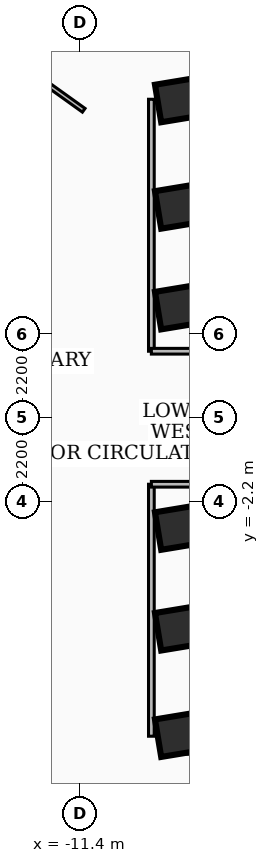
"""IFC4 building model, lengths in metres.
Left out: names, types, materials, properties, quantities, classifications, styles, units other than length and angle.
Written with IfcOpenShell. Run it as: python <this file> out.ifc"""

import sys

from ifc_helpers import new_model, si_unit, direction, frame, frame_2d, origin, origin_2d, place, context, subcontext, project, spatial, rectangle, extrude, element, save


model = new_model("IFC4")
c1 = context("Model", 3, precision=1e-05, world=origin(), true_north=direction((0.0, 1.0)))
c2 = subcontext(c1, "Body", "Model", "MODEL_VIEW")
j1 = project(units=[si_unit("LENGTHUNIT", "METRE"), si_unit("PLANEANGLEUNIT", "RADIAN")], contexts=[c1])
p1 = place(None, origin())
s1 = spatial("IfcSite", under=j1, at=p1, CompositionType="ELEMENT")
p2 = place(p1, origin())
s2 = spatial("IfcBuilding", under=s1, at=p2, CompositionType="ELEMENT")
p3 = place(p2, frame((0.0, 0.0, 92.88)))
s3 = spatial("IfcBuildingStorey", under=s2, at=p3, CompositionType="ELEMENT", Elevation=92.88)
for number, where, z_axis, x_axis in (
    (1, (-8.78, 8.56, 0.0), (0.0, 0.0, 1.0), (1.0, 0.0, 0.0)),
    (2, (8.78, -8.56, 0.0), (0.0, 0.0, 1.0), (-1.0, 0.0, 0.0)),
):
    element("IfcWall", number, at=place(p3, frame(where, z_axis=z_axis, x_axis=x_axis)), inside=s3, PredefinedType="SHEAR", context=c2, shape_type="SweptSolid", body=[
        extrude(rectangle(XDim=17.56, YDim=0.5, at=frame_2d((8.78, 0.0))), origin(), (0.0, 0.0, 1.0), 3.34),
    ])
for number, where, z_axis, x_axis in (
    (3, (-8.85, -5.55, 0.0), (0.0, 0.0, 1.0), (0.987, 0.163, 0.0)),
    (4, (-8.85, -2.9, 0.0), (0.0, 0.0, 1.0), (0.987, 0.163, 0.0)),
    (5, (-8.85, 2.9, 0.0), (0.0, 0.0, 1.0), (0.987, 0.163, 0.0)),
    (6, (-8.85, 5.55, 0.0), (0.0, 0.0, 1.0), (0.987, 0.163, 0.0)),
    (7, (-8.85, 8.35, 0.0), (0.0, 0.0, 1.0), (0.987, 0.163, 0.0)),
    (8, (-8.85, -8.35, 0.0), (0.0, 0.0, 1.0), (0.987, 0.163, 0.0)),
):
    element("IfcColumn", number, at=place(p3, frame(where, z_axis=z_axis, x_axis=x_axis)), inside=s3, PredefinedType="COLUMN", context=c2, shape_type="SweptSolid", body=[
        extrude(rectangle(XDim=1.0, YDim=1.0, at=origin_2d()), origin(), (0.0, 0.0, 1.0), 3.6),
    ])
p4 = place(p3, frame((-12.12, -15.142, 0.0), z_axis=(0.0, 0.0, 1.0), x_axis=(-0.163241835244, 0.986586085056, 0.0)))
e9 = element("IfcWall", 9, at=p4, inside=s3, PredefinedType="SOLIDWALL", context=c2, shape_type="SweptSolid", body=[
    extrude(rectangle(XDim=6.775, YDim=0.24, at=frame_2d((3.387, 0.0))), origin(), (0.0, 0.0, 1.0), 2.644),
])
p5 = place(p3, frame((-9.52, 1.75, 0.0), z_axis=(0.0, 0.0, 1.0), x_axis=(0.0, 1.0, 0.0)))
e10 = element("IfcWall", 10, at=p5, inside=s3, PredefinedType="PARTITIONING", context=c2, shape_type="SweptSolid", body=[
    extrude(rectangle(XDim=6.63, YDim=0.15, at=frame_2d((3.315, 0.0))), origin(), (0.0, 0.0, 1.0), 2.486),
])
p6 = place(p3, frame((-7.85, 1.75, 0.0), z_axis=(0.0, 0.0, 1.0), x_axis=(-1.0, 0.0, 0.0)))
e11 = element("IfcWall", 11, at=p6, inside=s3, PredefinedType="PARTITIONING", context=c2, shape_type="SweptSolid", body=[
    extrude(rectangle(XDim=1.67, YDim=0.15, at=frame_2d((0.835, 0.0))), origin(), (0.0, 0.0, 1.0), 2.405),
])
p7 = place(p3, frame((-9.52, -8.38, 0.0), z_axis=(0.0, 0.0, 1.0), x_axis=(0.0, 1.0, 0.0)))
e12 = element("IfcWall", 12, at=p7, inside=s3, PredefinedType="PARTITIONING", context=c2, shape_type="SweptSolid", body=[
    extrude(rectangle(XDim=6.63, YDim=0.15, at=frame_2d((3.315, 0.0))), origin(), (0.0, 0.0, 1.0), 2.486),
])
p8 = place(p3, frame((-7.85, -1.75, 0.0), z_axis=(0.0, 0.0, 1.0), x_axis=(-1.0, 0.0, 0.0)))
e13 = element("IfcWall", 13, at=p8, inside=s3, PredefinedType="PARTITIONING", context=c2, shape_type="SweptSolid", body=[
    extrude(rectangle(XDim=1.67, YDim=0.15, at=frame_2d((0.835, 0.0))), origin(), (0.0, 0.0, 1.0), 2.405),
])
p9 = place(p3, frame((-11.3, 8.09, 0.0), z_axis=(0.0, 0.0, 1.0), x_axis=(-0.813131268368, 0.582080355623, 0.0)))
e14 = element("IfcWall", 14, at=p9, inside=s3, PredefinedType="PARTITIONING", context=c2, shape_type="SweptSolid", body=[
    extrude(rectangle(XDim=5.757, YDim=0.12, at=frame_2d((2.878, 0.0))), origin(), (0.0, 0.0, 1.0), 3.34),
])
save(model, sys.argv[1])
